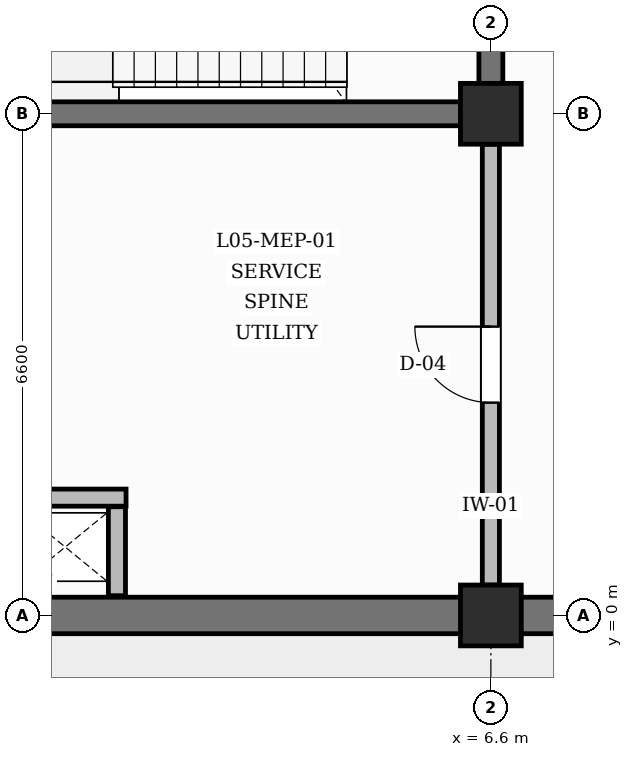
"""IFC4 building model, lengths in metres.
Left out: names, types, materials, properties, quantities, classifications, styles, units other than length and angle.
Written with IfcOpenShell. Run it as: python <this file> out.ifc"""

import sys

from ifc_helpers import new_model, si_unit, direction, frame, frame_2d, origin, origin_2d, place, context, subcontext, project, spatial, rectangle, extrude, element, fill, save


model = new_model("IFC4")
c1 = context("Model", 3, precision=1e-05, world=origin(), true_north=direction((0.0, 1.0)))
c2 = subcontext(c1, "Body", "Model", "MODEL_VIEW")
j1 = project(units=[si_unit("LENGTHUNIT", "METRE"), si_unit("PLANEANGLEUNIT", "RADIAN")], contexts=[c1])
p1 = place(None, origin())
s1 = spatial("IfcSite", under=j1, at=p1, CompositionType="ELEMENT")
p2 = place(p1, origin())
s2 = spatial("IfcBuilding", under=s1, at=p2, CompositionType="ELEMENT")
p3 = place(p2, frame((0.0, 0.0, 22.8)))
s3 = spatial("IfcBuildingStorey", under=s2, at=p3, CompositionType="ELEMENT", Elevation=22.8)
for number, where, z_axis, x_axis in (
    (1, (6.6, 0.0, 0.0), (0.0, 0.0, 1.0), (1.0, 0.0, 0.0)),
    (2, (6.6, 6.6, 0.0), (0.0, 0.0, 1.0), (1.0, 0.0, 0.0)),
):
    element("IfcColumn", number, at=place(p3, frame(where, z_axis=z_axis, x_axis=x_axis)), inside=s3, PredefinedType="COLUMN", context=c2, shape_type="SweptSolid", body=[
        extrude(rectangle(XDim=0.8, YDim=0.8, at=origin_2d()), origin(), (0.0, 0.0, 1.0), 4.2),
    ])
for number, where, z_axis, x_axis in (
    (3, (0.4, 0.0, 0.0), (0.0, 0.0, 1.0), (1.0, 0.0, 0.0)),
    (4, (7.0, 0.0, 0.0), (0.0, 0.0, 1.0), (1.0, 0.0, 0.0)),
):
    element("IfcWall", number, at=place(p3, frame(where, z_axis=z_axis, x_axis=x_axis)), inside=s3, PredefinedType="SOLIDWALL", context=c2, shape_type="SweptSolid", body=[
        extrude(rectangle(XDim=5.8, YDim=0.48, at=frame_2d((2.9, 0.0))), origin(), (0.0, 0.0, 1.0), 3.27),
    ])
p4 = place(p3, frame((0.4, 6.6, 0.0), z_axis=(0.0, 0.0, 1.0), x_axis=(1.0, 0.0, 0.0)))
e5 = element("IfcWall", 5, at=p4, inside=s3, PredefinedType="SHEAR", context=c2, shape_type="SweptSolid", body=[
    extrude(rectangle(XDim=5.8, YDim=0.315, at=frame_2d((2.9, 0.0))), origin(), (0.0, 0.0, 1.0), 3.17),
])
p5 = place(p3, frame((6.6, 7.0, 0.0), z_axis=(0.0, 0.0, 1.0), x_axis=(0.0, 1.0, 0.0)))
e6 = element("IfcWall", 6, at=p5, inside=s3, PredefinedType="SHEAR", context=c2, shape_type="SweptSolid", body=[
    extrude(rectangle(XDim=5.8, YDim=0.315, at=frame_2d((2.9, 0.0))), origin(), (0.0, 0.0, 1.0), 3.17),
])
p6 = place(p5, frame((2.35, 0.0, 0.0)))
e7 = element("IfcOpeningElement", 7, at=p6, cuts=e6, PredefinedType="OPENING", context=c2, shape_type="SweptSolid", body=[
    extrude(rectangle(XDim=1.1, YDim=2.15, at=frame_2d((0.55, 1.075))), frame((0.0, 0.167, 0.0), z_axis=(0.0, -1.0, 0.0), x_axis=(1.0, 0.0, 0.0)), (0.0, 0.0, 1.0), 0.335),
])
p7 = place(p3, frame((1.68, 0.26, 0.0), z_axis=(0.0, 0.0, 1.0), x_axis=(0.0, 1.0, 0.0)))
e8 = element("IfcWall", 8, at=p7, inside=s3, PredefinedType="PARTITIONING", context=c2, shape_type="SweptSolid", body=[
    extrude(rectangle(XDim=1.17, YDim=0.225, at=frame_2d((0.585, 0.0))), origin(), (0.0, 0.0, 1.0), 3.87),
])
p8 = place(p3, frame((0.26, 1.55, 0.0), z_axis=(0.0, 0.0, 1.0), x_axis=(1.0, 0.0, 0.0)))
e9 = element("IfcWall", 9, at=p8, inside=s3, PredefinedType="PARTITIONING", context=c2, shape_type="SweptSolid", body=[
    extrude(rectangle(XDim=1.54, YDim=0.225, at=frame_2d((0.77, 0.0))), origin(), (0.0, 0.0, 1.0), 3.87),
])
p9 = place(p3, frame((6.6, 0.4, 0.0), z_axis=(0.0, 0.0, 1.0), x_axis=(0.0, 1.0, 0.0)))
e10 = element("IfcWall", 10, at=p9, inside=s3, PredefinedType="PARTITIONING", context=c2, shape_type="SweptSolid", body=[
    extrude(rectangle(XDim=5.8, YDim=0.225, at=frame_2d((2.9, 0.0))), origin(), (0.0, 0.0, 1.0), 3.17),
])
p10 = place(p9, frame((2.4, 0.0, 0.0)))
e11 = element("IfcOpeningElement", 11, at=p10, cuts=e10, PredefinedType="OPENING", context=c2, shape_type="SweptSolid", body=[
    extrude(rectangle(XDim=1.0, YDim=2.1, at=frame_2d((0.5, 1.05))), frame((0.0, 0.123, 0.0), z_axis=(0.0, -1.0, 0.0), x_axis=(1.0, 0.0, 0.0)), (0.0, 0.0, 1.0), 0.245),
])
p11 = place(p10, origin())
e12 = element("IfcDoor", 12, at=p11, inside=s3, OperationType="SINGLE_SWING_RIGHT", PredefinedType="DOOR", context=c2, shape_type="SweptSolid", body=[
    extrude(rectangle(XDim=1.0, YDim=2.1, at=frame_2d((0.5, 1.05))), frame((0.0, 0.025, 0.0), z_axis=(0.0, -1.0, 0.0), x_axis=(1.0, 0.0, 0.0)), (0.0, 0.0, 1.0), 0.05),
])
fill(e11, e12)
save(model, sys.argv[1])
